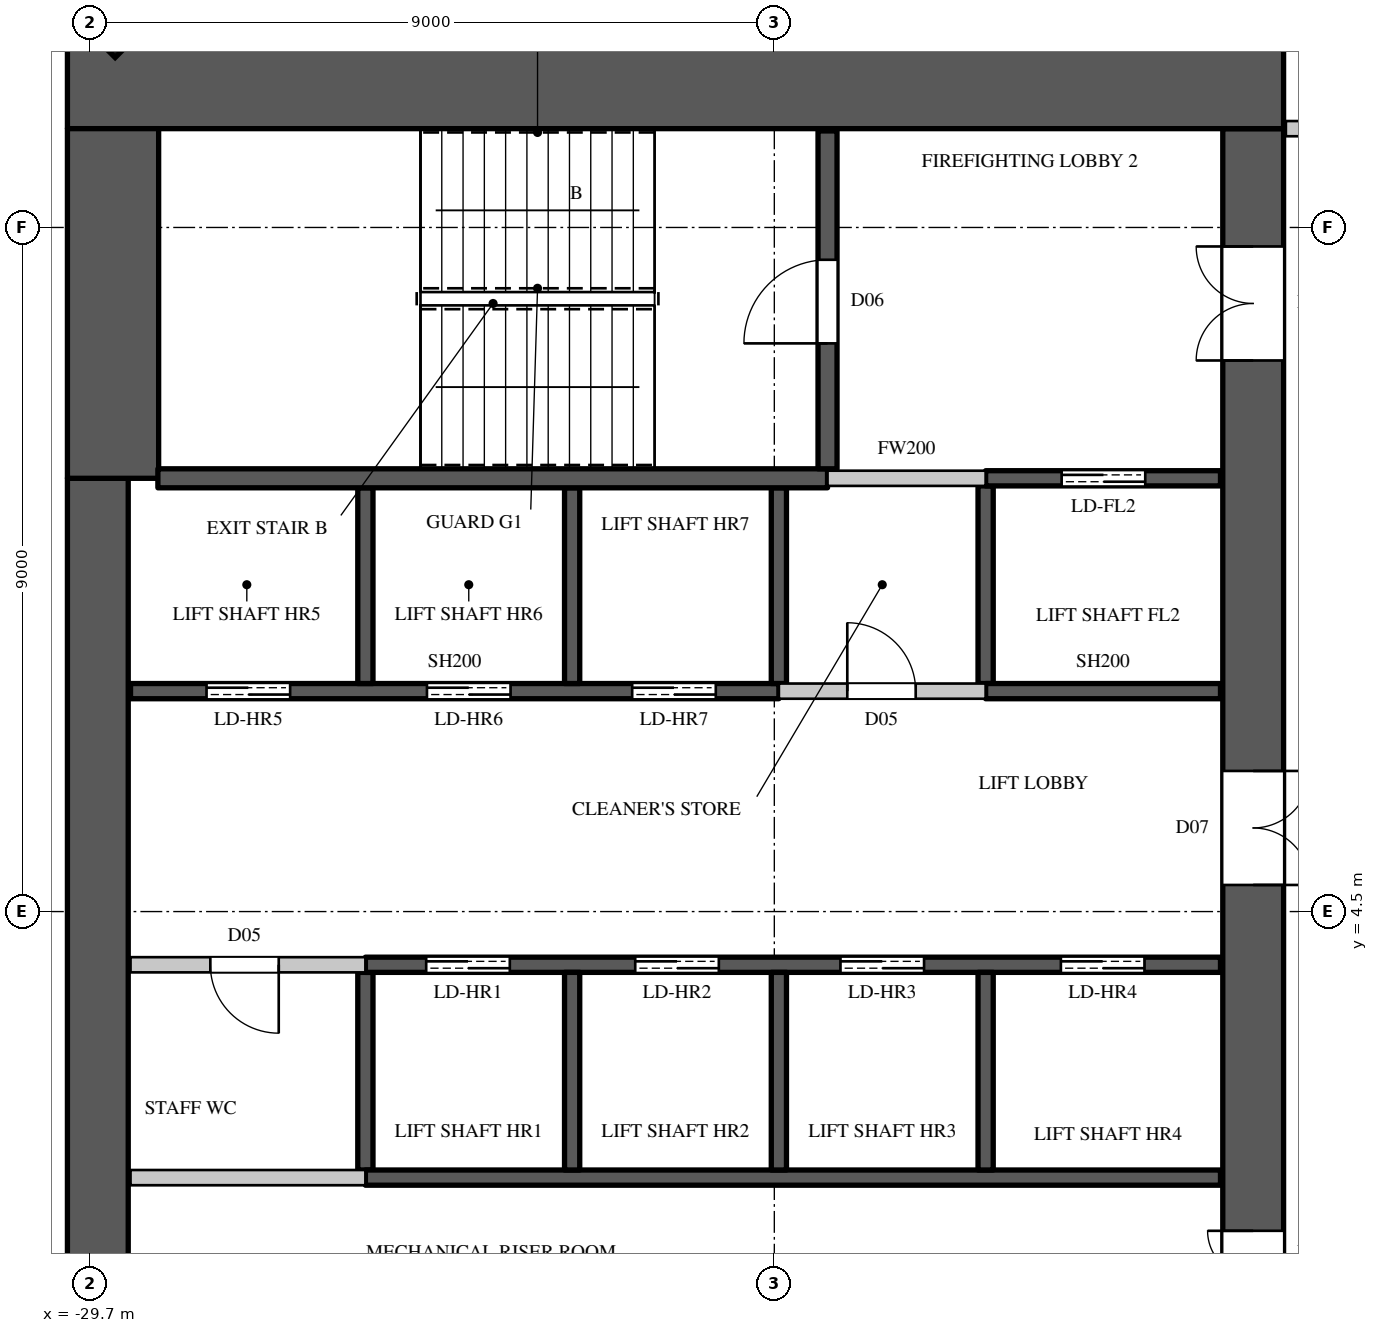
"""IFC4 building model, lengths in metres.
Left out: names, types, materials, properties, quantities, classifications, styles, units other than length and angle.
Written with IfcOpenShell. Run it as: python <this file> out.ifc"""

import sys

from ifc_helpers import new_model, si_unit, direction, frame, frame_2d, origin, origin_2d, place, context, subcontext, project, spatial, rectangle, extrude, element, fill, save


model = new_model("IFC4")
c1 = context("Model", 3, precision=1e-05, world=origin(), true_north=direction((0.0, 1.0)))
c2 = subcontext(c1, "Body", "Model", "MODEL_VIEW")
j1 = project(units=[si_unit("LENGTHUNIT", "METRE"), si_unit("PLANEANGLEUNIT", "RADIAN")], contexts=[c1])
p1 = place(None, origin())
s1 = spatial("IfcSite", under=j1, at=p1, CompositionType="ELEMENT")
p2 = place(p1, origin())
s2 = spatial("IfcBuilding", under=s1, at=p2, CompositionType="ELEMENT")
p3 = place(p2, frame((0.0, 0.0, 193.3)))
s3 = spatial("IfcBuildingStorey", under=s2, at=p3, CompositionType="ELEMENT", Elevation=193.3)
p4 = place(p3, frame((-29.443, 16.443, 0.0), z_axis=(0.0, 0.0, 1.0), x_axis=(-0.707106781187, -0.707106781187, 0.0)))
e1 = element("IfcColumn", 1, at=p4, inside=s3, PredefinedType="COLUMN", context=c2, shape_type="SweptSolid", body=[
    extrude(rectangle(XDim=0.9, YDim=1.1, at=origin_2d()), origin(), (0.0, 0.0, 1.0), 4.1),
])
p5 = place(p3, frame((-30.0, 15.4, 0.0), z_axis=(0.0, 0.0, 1.0), x_axis=(1.0, 0.0, 0.0)))
e2 = element("IfcWall", 2, at=p5, inside=s3, PredefinedType="SHEAR", context=c2, shape_type="SweptSolid", body=[
    extrude(rectangle(XDim=16.0, YDim=1.2, at=frame_2d((8.0, 0.0))), origin(), (0.0, 0.0, 1.0), 4.1),
])
p6 = place(p3, frame((-14.4, -14.8, 0.0), z_axis=(0.0, 0.0, 1.0), x_axis=(0.0, 1.0, 0.0)))
e3 = element("IfcWall", 3, at=p6, inside=s3, PredefinedType="SHEAR", context=c2, shape_type="SweptSolid", body=[
    extrude(rectangle(XDim=29.6, YDim=0.8, at=frame_2d((14.8, 0.0))), origin(), (0.0, 0.0, 1.0), 4.1),
])
p7 = place(p6, frame((1.55, 0.0, 0.0)))
e4 = element("IfcOpeningElement", 4, at=p7, cuts=e3, PredefinedType="OPENING", context=c2, shape_type="SweptSolid", body=[
    extrude(rectangle(XDim=1.5, YDim=2.4, at=frame_2d((0.75, 1.2))), frame((0.0, 0.41, 0.0), z_axis=(0.0, -1.0, 0.0), x_axis=(1.0, 0.0, 0.0)), (0.0, 0.0, 1.0), 0.82),
])
p8 = place(p6, frame((26.55, 0.0, 0.0)))
e5 = element("IfcOpeningElement", 5, at=p8, cuts=e3, PredefinedType="OPENING", context=c2, shape_type="SweptSolid", body=[
    extrude(rectangle(XDim=1.5, YDim=2.4, at=frame_2d((0.75, 1.2))), frame((0.0, 0.41, 0.0), z_axis=(0.0, -1.0, 0.0), x_axis=(1.0, 0.0, 0.0)), (0.0, 0.0, 1.0), 0.82),
])
p9 = place(p6, frame((8.45, 0.0, 0.0)))
e6 = element("IfcOpeningElement", 6, at=p9, cuts=e3, PredefinedType="OPENING", context=c2, shape_type="SweptSolid", body=[
    extrude(rectangle(XDim=1.5, YDim=2.4, at=frame_2d((0.75, 1.2))), frame((0.0, 0.41, 0.0), z_axis=(0.0, -1.0, 0.0), x_axis=(1.0, 0.0, 0.0)), (0.0, 0.0, 1.0), 0.82),
])
p10 = place(p6, frame((19.65, 0.0, 0.0)))
e7 = element("IfcOpeningElement", 7, at=p10, cuts=e3, PredefinedType="OPENING", context=c2, shape_type="SweptSolid", body=[
    extrude(rectangle(XDim=1.5, YDim=2.4, at=frame_2d((0.75, 1.2))), frame((0.0, 0.41, 0.0), z_axis=(0.0, -1.0, 0.0), x_axis=(1.0, 0.0, 0.0)), (0.0, 0.0, 1.0), 0.82),
])
p11 = place(p6, frame((14.5, 0.0, 0.0)))
e8 = element("IfcOpeningElement", 8, at=p11, cuts=e3, PredefinedType="OPENING", context=c2, shape_type="SweptSolid", body=[
    extrude(rectangle(XDim=0.6, YDim=2.0, at=frame_2d((0.3, 1.0))), frame((0.0, 0.41, 0.0), z_axis=(0.0, -1.0, 0.0), x_axis=(1.0, 0.0, 0.0)), (0.0, 0.0, 1.0), 0.82),
])
p12 = place(p3, frame((-29.6, -10.2, 0.0), z_axis=(0.0, 0.0, 1.0), x_axis=(0.0, 1.0, 0.0)))
e9 = element("IfcWall", 9, at=p12, inside=s3, PredefinedType="SHEAR", context=c2, shape_type="SweptSolid", body=[
    extrude(rectangle(XDim=20.4, YDim=0.8, at=frame_2d((10.2, 0.0))), origin(), (0.0, 0.0, 1.0), 4.1),
])
p13 = place(p3, frame((-29.4, 10.2, 0.0), z_axis=(0.0, 0.0, 1.0), x_axis=(0.0, 1.0, 0.0)))
e10 = element("IfcWall", 10, at=p13, inside=s3, PredefinedType="SHEAR", context=c2, shape_type="SweptSolid", body=[
    extrude(rectangle(XDim=4.6, YDim=1.2, at=frame_2d((2.3, 0.0))), origin(), (0.0, 0.0, 1.0), 4.1),
])
p14 = place(p3, frame((-29.17, 3.8, 0.0), z_axis=(0.0, 0.0, 1.0), x_axis=(1.0, 0.0, 0.0)))
e11 = element("IfcWall", 11, at=p14, inside=s3, PredefinedType="PARTITIONING", context=c2, shape_type="SweptSolid", body=[
    extrude(rectangle(XDim=3.09, YDim=0.2, at=frame_2d((1.545, 0.0))), origin(), (0.0, 0.0, 1.0), 3.8),
])
p15 = place(p14, frame((1.05, 0.0, 0.0)))
e12 = element("IfcOpeningElement", 12, at=p15, cuts=e11, PredefinedType="OPENING", context=c2, shape_type="SweptSolid", body=[
    extrude(rectangle(XDim=0.9, YDim=2.2, at=frame_2d((0.45, 1.1))), frame((0.0, 0.11, 0.0), z_axis=(0.0, -1.0, 0.0), x_axis=(1.0, 0.0, 0.0)), (0.0, 0.0, 1.0), 0.22),
])
p16 = place(p3, frame((-20.64, 7.4, 0.0), z_axis=(0.0, 0.0, 1.0), x_axis=(1.0, 0.0, 0.0)))
e13 = element("IfcWall", 13, at=p16, inside=s3, PredefinedType="PARTITIONING", context=c2, shape_type="SweptSolid", body=[
    extrude(rectangle(XDim=2.72, YDim=0.2, at=frame_2d((1.36, 0.0))), origin(), (0.0, 0.0, 1.0), 3.8),
])
p17 = place(p16, frame((0.9, 0.0, 0.0)))
e14 = element("IfcOpeningElement", 14, at=p17, cuts=e13, PredefinedType="OPENING", context=c2, shape_type="SweptSolid", body=[
    extrude(rectangle(XDim=0.9, YDim=2.2, at=frame_2d((0.45, 1.1))), frame((0.0, 0.11, 0.0), z_axis=(0.0, -1.0, 0.0), x_axis=(1.0, 0.0, 0.0)), (0.0, 0.0, 1.0), 0.22),
])
p18 = place(p3, frame((-20.0, 10.2, 0.0), z_axis=(0.0, 0.0, 1.0), x_axis=(1.0, 0.0, 0.0)))
e15 = element("IfcWall", 15, at=p18, inside=s3, PredefinedType="PARTITIONING", context=c2, shape_type="SweptSolid", body=[
    extrude(rectangle(XDim=2.08, YDim=0.2, at=frame_2d((1.04, 0.0))), origin(), (0.0, 0.0, 1.0), 3.8),
])
p19 = place(p3, frame((-13.97, 14.8, 0.0), z_axis=(0.0, 0.0, 1.0), x_axis=(1.0, 0.0, 0.0)))
e16 = element("IfcWall", 16, at=p19, inside=s3, PredefinedType="PARTITIONING", context=c2, shape_type="SweptSolid", body=[
    extrude(rectangle(XDim=2.87, YDim=0.2, at=frame_2d((1.435, 0.0))), origin(), (0.0, 0.0, 1.0), 3.8),
])
p20 = place(p3, frame((-29.17, 1.0, 0.0), z_axis=(0.0, 0.0, 1.0), x_axis=(1.0, 0.0, 0.0)))
e17 = element("IfcWall", 17, at=p20, inside=s3, PredefinedType="PARTITIONING", context=c2, shape_type="SweptSolid", body=[
    extrude(rectangle(XDim=3.09, YDim=0.2, at=frame_2d((1.545, 0.0))), origin(), (0.0, 0.0, 1.0), 3.8),
])
p21 = place(p3, frame((-29.17, 7.4, 0.0), z_axis=(0.0, 0.0, 1.0), x_axis=(1.0, 0.0, 0.0)))
e18 = element("IfcWall", 18, at=p21, inside=s3, PredefinedType="SHEAR", context=c2, shape_type="SweptSolid", body=[
    extrude(rectangle(XDim=8.53, YDim=0.2, at=frame_2d((4.265, 0.0))), origin(), (0.0, 0.0, 1.0), 3.8),
])
p22 = place(p21, frame((1.0, 0.0, 0.0)))
e19 = element("IfcOpeningElement", 19, at=p22, cuts=e18, PredefinedType="OPENING", context=c2, shape_type="SweptSolid", body=[
    extrude(rectangle(XDim=1.1, YDim=2.2, at=frame_2d((0.55, 1.1))), frame((0.0, 0.11, 0.0), z_axis=(0.0, -1.0, 0.0), x_axis=(1.0, 0.0, 0.0)), (0.0, 0.0, 1.0), 0.22),
])
p23 = place(p21, frame((3.9, 0.0, 0.0)))
e20 = element("IfcOpeningElement", 20, at=p23, cuts=e18, PredefinedType="OPENING", context=c2, shape_type="SweptSolid", body=[
    extrude(rectangle(XDim=1.1, YDim=2.2, at=frame_2d((0.55, 1.1))), frame((0.0, 0.11, 0.0), z_axis=(0.0, -1.0, 0.0), x_axis=(1.0, 0.0, 0.0)), (0.0, 0.0, 1.0), 0.22),
])
p24 = place(p21, frame((6.6, 0.0, 0.0)))
e21 = element("IfcOpeningElement", 21, at=p24, cuts=e18, PredefinedType="OPENING", context=c2, shape_type="SweptSolid", body=[
    extrude(rectangle(XDim=1.1, YDim=2.2, at=frame_2d((0.55, 1.1))), frame((0.0, 0.11, 0.0), z_axis=(0.0, -1.0, 0.0), x_axis=(1.0, 0.0, 0.0)), (0.0, 0.0, 1.0), 0.22),
])
p25 = place(p3, frame((-26.08, 1.1, 0.0), z_axis=(0.0, 0.0, 1.0), x_axis=(0.0, 1.0, 0.0)))
e22 = element("IfcWall", 22, at=p25, inside=s3, PredefinedType="SHEAR", context=c2, shape_type="SweptSolid", body=[
    extrude(rectangle(XDim=2.6, YDim=0.2, at=frame_2d((1.3, 0.0))), origin(), (0.0, 0.0, 1.0), 3.8),
])
p26 = place(p3, frame((-26.08, 1.0, 0.0), z_axis=(0.0, 0.0, 1.0), x_axis=(1.0, 0.0, 0.0)))
e23 = element("IfcWall", 23, at=p26, inside=s3, PredefinedType="SHEAR", context=c2, shape_type="SweptSolid", body=[
    extrude(rectangle(XDim=11.25, YDim=0.2, at=frame_2d((5.625, 0.0))), origin(), (0.0, 0.0, 1.0), 3.8),
])
p27 = place(p3, frame((-26.08, 3.8, 0.0), z_axis=(0.0, 0.0, 1.0), x_axis=(1.0, 0.0, 0.0)))
e24 = element("IfcWall", 24, at=p27, inside=s3, PredefinedType="SHEAR", context=c2, shape_type="SweptSolid", body=[
    extrude(rectangle(XDim=11.25, YDim=0.2, at=frame_2d((5.625, 0.0))), origin(), (0.0, 0.0, 1.0), 3.8),
])
p28 = place(p27, frame((0.8, 0.0, 0.0)))
e25 = element("IfcOpeningElement", 25, at=p28, cuts=e24, PredefinedType="OPENING", context=c2, shape_type="SweptSolid", body=[
    extrude(rectangle(XDim=1.1, YDim=2.2, at=frame_2d((0.55, 1.1))), frame((0.0, 0.11, 0.0), z_axis=(0.0, -1.0, 0.0), x_axis=(1.0, 0.0, 0.0)), (0.0, 0.0, 1.0), 0.22),
])
p29 = place(p27, frame((3.55, 0.0, 0.0)))
e26 = element("IfcOpeningElement", 26, at=p29, cuts=e24, PredefinedType="OPENING", context=c2, shape_type="SweptSolid", body=[
    extrude(rectangle(XDim=1.1, YDim=2.2, at=frame_2d((0.55, 1.1))), frame((0.0, 0.11, 0.0), z_axis=(0.0, -1.0, 0.0), x_axis=(1.0, 0.0, 0.0)), (0.0, 0.0, 1.0), 0.22),
])
p30 = place(p27, frame((6.25, 0.0, 0.0)))
e27 = element("IfcOpeningElement", 27, at=p30, cuts=e24, PredefinedType="OPENING", context=c2, shape_type="SweptSolid", body=[
    extrude(rectangle(XDim=1.1, YDim=2.2, at=frame_2d((0.55, 1.1))), frame((0.0, 0.11, 0.0), z_axis=(0.0, -1.0, 0.0), x_axis=(1.0, 0.0, 0.0)), (0.0, 0.0, 1.0), 0.22),
])
p31 = place(p27, frame((9.15, 0.0, 0.0)))
e28 = element("IfcOpeningElement", 28, at=p31, cuts=e24, PredefinedType="OPENING", context=c2, shape_type="SweptSolid", body=[
    extrude(rectangle(XDim=1.1, YDim=2.2, at=frame_2d((0.55, 1.1))), frame((0.0, 0.11, 0.0), z_axis=(0.0, -1.0, 0.0), x_axis=(1.0, 0.0, 0.0)), (0.0, 0.0, 1.0), 0.22),
])
p32 = place(p3, frame((-26.08, 7.5, 0.0), z_axis=(0.0, 0.0, 1.0), x_axis=(0.0, 1.0, 0.0)))
e29 = element("IfcWall", 29, at=p32, inside=s3, PredefinedType="SHEAR", context=c2, shape_type="SweptSolid", body=[
    extrude(rectangle(XDim=2.575, YDim=0.2, at=frame_2d((1.288, 0.0))), origin(), (0.0, 0.0, 1.0), 4.1),
])
p33 = place(p3, frame((-23.36, 1.1, 0.0), z_axis=(0.0, 0.0, 1.0), x_axis=(0.0, 1.0, 0.0)))
e30 = element("IfcWall", 30, at=p33, inside=s3, PredefinedType="SHEAR", context=c2, shape_type="SweptSolid", body=[
    extrude(rectangle(XDim=2.6, YDim=0.2, at=frame_2d((1.3, 0.0))), origin(), (0.0, 0.0, 1.0), 4.1),
])
p34 = place(p3, frame((-23.36, 7.5, 0.0), z_axis=(0.0, 0.0, 1.0), x_axis=(0.0, 1.0, 0.0)))
e31 = element("IfcWall", 31, at=p34, inside=s3, PredefinedType="SHEAR", context=c2, shape_type="SweptSolid", body=[
    extrude(rectangle(XDim=2.575, YDim=0.2, at=frame_2d((1.288, 0.0))), origin(), (0.0, 0.0, 1.0), 4.1),
])
p35 = place(p3, frame((-20.64, 1.1, 0.0), z_axis=(0.0, 0.0, 1.0), x_axis=(0.0, 1.0, 0.0)))
e32 = element("IfcWall", 32, at=p35, inside=s3, PredefinedType="SHEAR", context=c2, shape_type="SweptSolid", body=[
    extrude(rectangle(XDim=2.6, YDim=0.2, at=frame_2d((1.3, 0.0))), origin(), (0.0, 0.0, 1.0), 4.1),
])
p36 = place(p3, frame((-20.64, 7.5, 0.0), z_axis=(0.0, 0.0, 1.0), x_axis=(0.0, 1.0, 0.0)))
e33 = element("IfcWall", 33, at=p36, inside=s3, PredefinedType="SHEAR", context=c2, shape_type="SweptSolid", body=[
    extrude(rectangle(XDim=2.575, YDim=0.2, at=frame_2d((1.288, 0.0))), origin(), (0.0, 0.0, 1.0), 3.8),
])
p37 = place(p3, frame((-17.92, 1.1, 0.0), z_axis=(0.0, 0.0, 1.0), x_axis=(0.0, 1.0, 0.0)))
e34 = element("IfcWall", 34, at=p37, inside=s3, PredefinedType="SHEAR", context=c2, shape_type="SweptSolid", body=[
    extrude(rectangle(XDim=2.6, YDim=0.2, at=frame_2d((1.3, 0.0))), origin(), (0.0, 0.0, 1.0), 4.1),
])
p38 = place(p3, frame((-17.92, 7.5, 0.0), z_axis=(0.0, 0.0, 1.0), x_axis=(0.0, 1.0, 0.0)))
e35 = element("IfcWall", 35, at=p38, inside=s3, PredefinedType="SHEAR", context=c2, shape_type="SweptSolid", body=[
    extrude(rectangle(XDim=2.6, YDim=0.2, at=frame_2d((1.3, 0.0))), origin(), (0.0, 0.0, 1.0), 3.8),
])
p39 = place(p3, frame((-17.92, 7.4, 0.0), z_axis=(0.0, 0.0, 1.0), x_axis=(1.0, 0.0, 0.0)))
e36 = element("IfcWall", 36, at=p39, inside=s3, PredefinedType="SHEAR", context=c2, shape_type="SweptSolid", body=[
    extrude(rectangle(XDim=3.09, YDim=0.2, at=frame_2d((1.545, 0.0))), origin(), (0.0, 0.0, 1.0), 3.8),
])
p40 = place(p3, frame((-17.92, 10.2, 0.0), z_axis=(0.0, 0.0, 1.0), x_axis=(1.0, 0.0, 0.0)))
e37 = element("IfcWall", 37, at=p40, inside=s3, PredefinedType="SHEAR", context=c2, shape_type="SweptSolid", body=[
    extrude(rectangle(XDim=3.09, YDim=0.2, at=frame_2d((1.545, 0.0))), origin(), (0.0, 0.0, 1.0), 3.8),
])
p41 = place(p40, frame((1.0, 0.0, 0.0)))
e38 = element("IfcOpeningElement", 38, at=p41, cuts=e37, PredefinedType="OPENING", context=c2, shape_type="SweptSolid", body=[
    extrude(rectangle(XDim=1.1, YDim=2.2, at=frame_2d((0.55, 1.1))), frame((0.0, 0.11, 0.0), z_axis=(0.0, -1.0, 0.0), x_axis=(1.0, 0.0, 0.0)), (0.0, 0.0, 1.0), 0.22),
])
p42 = place(p3, frame((-28.81, 10.2, 0.0), z_axis=(0.0, 0.0, 1.0), x_axis=(1.0, 0.0, 0.0)))
e39 = element("IfcWall", 39, at=p42, inside=s3, PredefinedType="SHEAR", context=c2, shape_type="SweptSolid", body=[
    extrude(rectangle(XDim=8.81, YDim=0.25, at=frame_2d((4.405, 0.0))), origin(), (0.0, 0.0, 1.0), 3.8),
])
p43 = place(p3, frame((-20.0, 10.325, 0.0), z_axis=(0.0, 0.0, 1.0), x_axis=(0.0, 1.0, 0.0)))
e40 = element("IfcWall", 40, at=p43, inside=s3, PredefinedType="SHEAR", context=c2, shape_type="SweptSolid", body=[
    extrude(rectangle(XDim=4.445, YDim=0.25, at=frame_2d((2.223, 0.0))), origin(), (0.0, 0.0, 1.0), 3.8),
])
p44 = place(p43, frame((1.65, 0.0, 0.0)))
e41 = element("IfcOpeningElement", 41, at=p44, cuts=e40, PredefinedType="OPENING", context=c2, shape_type="SweptSolid", body=[
    extrude(rectangle(XDim=1.1, YDim=2.2, at=frame_2d((0.55, 1.1))), frame((0.0, 0.135, 0.0), z_axis=(0.0, -1.0, 0.0), x_axis=(1.0, 0.0, 0.0)), (0.0, 0.0, 1.0), 0.27),
])
p45 = place(p44, origin())
e42 = element("IfcDoor", 42, at=p45, inside=s3, OperationType="SINGLE_SWING_LEFT", PredefinedType="DOOR", context=c2, shape_type="SweptSolid", body=[
    extrude(rectangle(XDim=1.1, YDim=2.2, at=frame_2d((0.55, 1.1))), frame((0.0, 0.025, 0.0), z_axis=(0.0, -1.0, 0.0), x_axis=(1.0, 0.0, 0.0)), (0.0, 0.0, 1.0), 0.05),
])
fill(e41, e42)
p46 = place(p15, origin())
e43 = element("IfcDoor", 43, at=p46, inside=s3, OperationType="SINGLE_SWING_LEFT", PredefinedType="DOOR", context=c2, shape_type="SweptSolid", body=[
    extrude(rectangle(XDim=0.9, YDim=2.2, at=frame_2d((0.45, 1.1))), frame((0.0, 0.025, 0.0), z_axis=(0.0, -1.0, 0.0), x_axis=(1.0, 0.0, 0.0)), (0.0, 0.0, 1.0), 0.05),
])
fill(e12, e43)
p47 = place(p17, origin())
e44 = element("IfcDoor", 44, at=p47, inside=s3, OperationType="SINGLE_SWING_LEFT", PredefinedType="DOOR", context=c2, shape_type="SweptSolid", body=[
    extrude(rectangle(XDim=0.9, YDim=2.2, at=frame_2d((0.45, 1.1))), frame((0.0, 0.025, 0.0), z_axis=(0.0, -1.0, 0.0), x_axis=(1.0, 0.0, 0.0)), (0.0, 0.0, 1.0), 0.05),
])
fill(e14, e44)
p48 = place(p28, origin())
e45 = element("IfcDoor", 45, at=p48, inside=s3, OperationType="DOUBLE_DOOR_SLIDING", PredefinedType="DOOR", context=c2, shape_type="SweptSolid", body=[
    extrude(rectangle(XDim=1.1, YDim=2.2, at=frame_2d((0.55, 1.1))), frame((0.0, 0.025, 0.0), z_axis=(0.0, -1.0, 0.0), x_axis=(1.0, 0.0, 0.0)), (0.0, 0.0, 1.0), 0.05),
])
fill(e25, e45)
p49 = place(p29, origin())
e46 = element("IfcDoor", 46, at=p49, inside=s3, OperationType="DOUBLE_DOOR_SLIDING", PredefinedType="DOOR", context=c2, shape_type="SweptSolid", body=[
    extrude(rectangle(XDim=1.1, YDim=2.2, at=frame_2d((0.55, 1.1))), frame((0.0, 0.025, 0.0), z_axis=(0.0, -1.0, 0.0), x_axis=(1.0, 0.0, 0.0)), (0.0, 0.0, 1.0), 0.05),
])
fill(e26, e46)
p50 = place(p30, origin())
e47 = element("IfcDoor", 47, at=p50, inside=s3, OperationType="DOUBLE_DOOR_SLIDING", PredefinedType="DOOR", context=c2, shape_type="SweptSolid", body=[
    extrude(rectangle(XDim=1.1, YDim=2.2, at=frame_2d((0.55, 1.1))), frame((0.0, 0.025, 0.0), z_axis=(0.0, -1.0, 0.0), x_axis=(1.0, 0.0, 0.0)), (0.0, 0.0, 1.0), 0.05),
])
fill(e27, e47)
p51 = place(p31, origin())
e48 = element("IfcDoor", 48, at=p51, inside=s3, OperationType="DOUBLE_DOOR_SLIDING", PredefinedType="DOOR", context=c2, shape_type="SweptSolid", body=[
    extrude(rectangle(XDim=1.1, YDim=2.2, at=frame_2d((0.55, 1.1))), frame((0.0, 0.025, 0.0), z_axis=(0.0, -1.0, 0.0), x_axis=(1.0, 0.0, 0.0)), (0.0, 0.0, 1.0), 0.05),
])
fill(e28, e48)
p52 = place(p22, origin())
e49 = element("IfcDoor", 49, at=p52, inside=s3, OperationType="DOUBLE_DOOR_SLIDING", PredefinedType="DOOR", context=c2, shape_type="SweptSolid", body=[
    extrude(rectangle(XDim=1.1, YDim=2.2, at=frame_2d((0.55, 1.1))), frame((0.0, 0.025, 0.0), z_axis=(0.0, -1.0, 0.0), x_axis=(1.0, 0.0, 0.0)), (0.0, 0.0, 1.0), 0.05),
])
fill(e19, e49)
p53 = place(p23, origin())
e50 = element("IfcDoor", 50, at=p53, inside=s3, OperationType="DOUBLE_DOOR_SLIDING", PredefinedType="DOOR", context=c2, shape_type="SweptSolid", body=[
    extrude(rectangle(XDim=1.1, YDim=2.2, at=frame_2d((0.55, 1.1))), frame((0.0, 0.025, 0.0), z_axis=(0.0, -1.0, 0.0), x_axis=(1.0, 0.0, 0.0)), (0.0, 0.0, 1.0), 0.05),
])
fill(e20, e50)
p54 = place(p24, origin())
e51 = element("IfcDoor", 51, at=p54, inside=s3, OperationType="DOUBLE_DOOR_SLIDING", PredefinedType="DOOR", context=c2, shape_type="SweptSolid", body=[
    extrude(rectangle(XDim=1.1, YDim=2.2, at=frame_2d((0.55, 1.1))), frame((0.0, 0.025, 0.0), z_axis=(0.0, -1.0, 0.0), x_axis=(1.0, 0.0, 0.0)), (0.0, 0.0, 1.0), 0.05),
])
fill(e21, e51)
p55 = place(p41, origin())
e52 = element("IfcDoor", 52, at=p55, inside=s3, OperationType="DOUBLE_DOOR_SLIDING", PredefinedType="DOOR", context=c2, shape_type="SweptSolid", body=[
    extrude(rectangle(XDim=1.1, YDim=2.2, at=frame_2d((0.55, 1.1))), frame((0.0, 0.025, 0.0), z_axis=(0.0, -1.0, 0.0), x_axis=(1.0, 0.0, 0.0)), (0.0, 0.0, 1.0), 0.05),
])
fill(e38, e52)
p56 = place(p8, origin())
e53 = element("IfcDoor", 53, at=p56, inside=s3, OperationType="DOUBLE_DOOR_SINGLE_SWING", PredefinedType="DOOR", context=c2, shape_type="SweptSolid", body=[
    extrude(rectangle(XDim=1.5, YDim=2.4, at=frame_2d((0.75, 1.2))), frame((0.0, 0.395, 0.0), z_axis=(0.0, -1.0, 0.0), x_axis=(1.0, 0.0, 0.0)), (0.0, 0.0, 1.0), 0.05),
])
fill(e5, e53)
p57 = place(p10, origin())
e54 = element("IfcDoor", 54, at=p57, inside=s3, OperationType="DOUBLE_DOOR_SINGLE_SWING", PredefinedType="DOOR", context=c2, shape_type="SweptSolid", body=[
    extrude(rectangle(XDim=1.5, YDim=2.4, at=frame_2d((0.75, 1.2))), frame((0.0, -0.345, 0.0), z_axis=(0.0, -1.0, 0.0), x_axis=(1.0, 0.0, 0.0)), (0.0, 0.0, 1.0), 0.05),
])
fill(e7, e54)
p58 = place(p11, origin())
e55 = element("IfcDoor", 55, at=p58, inside=s3, OperationType="SINGLE_SWING_RIGHT", PredefinedType="DOOR", context=c2, shape_type="SweptSolid", body=[
    extrude(rectangle(XDim=0.6, YDim=2.0, at=frame_2d((0.3, 1.0))), frame((0.0, 0.395, 0.0), z_axis=(0.0, -1.0, 0.0), x_axis=(1.0, 0.0, 0.0)), (0.0, 0.0, 1.0), 0.05),
])
fill(e8, e55)
save(model, sys.argv[1])
